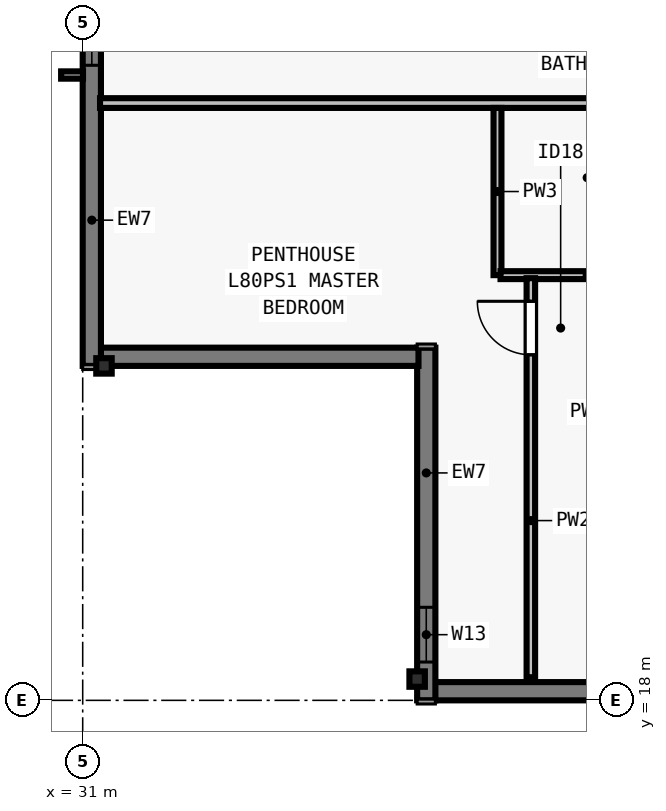
"""IFC4 building model, lengths in metres.
Left out: names, types, materials, properties, quantities, classifications, styles, units other than length and angle.
Written with IfcOpenShell. Run it as: python <this file> out.ifc"""

import sys

from ifc_helpers import new_model, si_unit, direction, frame, frame_2d, origin, origin_2d, place, context, subcontext, project, spatial, rectangle, i_section, extrude, element, fill, save


model = new_model("IFC4")
c1 = context("Model", 3, precision=1e-05, world=origin(), true_north=direction((0.0, 1.0)))
c2 = subcontext(c1, "Body", "Model", "MODEL_VIEW")
j1 = project(units=[si_unit("LENGTHUNIT", "METRE"), si_unit("PLANEANGLEUNIT", "RADIAN")], contexts=[c1])
p1 = place(None, origin())
s1 = spatial("IfcSite", under=j1, at=p1, CompositionType="ELEMENT")
p2 = place(p1, origin())
s2 = spatial("IfcBuilding", under=s1, at=p2, CompositionType="ELEMENT")
p3 = place(p2, frame((0.0, 0.0, 291.0)))
s3 = spatial("IfcBuildingStorey", under=s2, at=p3, CompositionType="ELEMENT", Elevation=291.0)
for number, where, z_axis, x_axis in (
    (1, (36.5, 18.35, 0.0), (0.0, 0.0, 1.0), (1.0, 0.0, 0.0)),
    (2, (31.35, 23.5, 0.0), (0.0, 0.0, 1.0), (0.0, 1.0, 0.0)),
):
    element("IfcColumn", number, at=place(p3, frame(where, z_axis=z_axis, x_axis=x_axis)), inside=s3, PredefinedType="COLUMN", context=c2, shape_type="SweptSolid", body=[
        extrude(i_section(OverallWidth=0.254, OverallDepth=0.254, WebThickness=0.009, FlangeThickness=0.014, FilletRadius=0.013, at=origin_2d()), origin(), (0.0, 0.0, 1.0), 3.5),
    ])
p4 = place(p3, frame((67.5, 18.15, 0.0), z_axis=(0.0, 0.0, 1.0), x_axis=(-1.0, 0.0, 0.0)))
e3 = element("IfcWall", 3, at=p4, inside=s3, PredefinedType="SOLIDWALL", context=c2, shape_type="SweptSolid", body=[
    extrude(rectangle(XDim=30.722, YDim=0.3, at=frame_2d((15.361, 0.0))), origin(), (0.0, 0.0, 1.0), 3.29),
])
p5 = place(p4, frame((4.944, 0.0, 0.8)))
e4 = element("IfcOpeningElement", 4, at=p5, cuts=e3, PredefinedType="OPENING", context=c2, shape_type="SweptSolid", body=[
    extrude(rectangle(XDim=1.65, YDim=1.758, at=frame_2d((0.825, 0.879))), frame((0.0, 0.16, 0.0), z_axis=(0.0, -1.0, 0.0), x_axis=(1.0, 0.0, 0.0)), (0.0, 0.0, 1.0), 0.32),
])
p6 = place(p4, frame((7.756, 0.0, 0.8)))
e5 = element("IfcOpeningElement", 5, at=p6, cuts=e3, PredefinedType="OPENING", context=c2, shape_type="SweptSolid", body=[
    extrude(rectangle(XDim=2.0, YDim=1.758, at=frame_2d((1.0, 0.879))), frame((0.0, 0.16, 0.0), z_axis=(0.0, -1.0, 0.0), x_axis=(1.0, 0.0, 0.0)), (0.0, 0.0, 1.0), 0.32),
])
p7 = place(p4, frame((12.617, 0.0, 0.8)))
e6 = element("IfcOpeningElement", 6, at=p7, cuts=e3, PredefinedType="OPENING", context=c2, shape_type="SweptSolid", body=[
    extrude(rectangle(XDim=1.65, YDim=1.758, at=frame_2d((0.825, 0.879))), frame((0.0, 0.16, 0.0), z_axis=(0.0, -1.0, 0.0), x_axis=(1.0, 0.0, 0.0)), (0.0, 0.0, 1.0), 0.32),
])
p8 = place(p4, frame((16.28, 0.0, 0.8)))
e7 = element("IfcOpeningElement", 7, at=p8, cuts=e3, PredefinedType="OPENING", context=c2, shape_type="SweptSolid", body=[
    extrude(rectangle(XDim=2.0, YDim=1.758, at=frame_2d((1.0, 0.879))), frame((0.0, 0.16, 0.0), z_axis=(0.0, -1.0, 0.0), x_axis=(1.0, 0.0, 0.0)), (0.0, 0.0, 1.0), 0.32),
])
p9 = place(p4, frame((21.142, 0.0, 0.8)))
e8 = element("IfcOpeningElement", 8, at=p9, cuts=e3, PredefinedType="OPENING", context=c2, shape_type="SweptSolid", body=[
    extrude(rectangle(XDim=1.65, YDim=1.758, at=frame_2d((0.825, 0.879))), frame((0.0, 0.16, 0.0), z_axis=(0.0, -1.0, 0.0), x_axis=(1.0, 0.0, 0.0)), (0.0, 0.0, 1.0), 0.32),
])
p10 = place(p4, frame((23.954, 0.0, 0.8)))
e9 = element("IfcOpeningElement", 9, at=p10, cuts=e3, PredefinedType="OPENING", context=c2, shape_type="SweptSolid", body=[
    extrude(rectangle(XDim=2.0, YDim=1.758, at=frame_2d((1.0, 0.879))), frame((0.0, 0.16, 0.0), z_axis=(0.0, -1.0, 0.0), x_axis=(1.0, 0.0, 0.0)), (0.0, 0.0, 1.0), 0.32),
])
p11 = place(p3, frame((36.65, 18.0, 0.0), z_axis=(0.0, 0.0, 1.0), x_axis=(0.0, 1.0, 0.0)))
e10 = element("IfcWall", 10, at=p11, inside=s3, PredefinedType="SOLIDWALL", context=c2, shape_type="SweptSolid", body=[
    extrude(rectangle(XDim=5.8, YDim=0.3, at=frame_2d((2.9, 0.0))), origin(), (0.0, 0.0, 1.0), 3.29),
])
p12 = place(p11, frame((0.63, 0.0, 0.8)))
e11 = element("IfcOpeningElement", 11, at=p12, cuts=e10, PredefinedType="OPENING", context=c2, shape_type="SweptSolid", body=[
    extrude(rectangle(XDim=0.9, YDim=1.75, at=frame_2d((0.45, 0.875))), frame((0.0, 0.16, 0.0), z_axis=(0.0, -1.0, 0.0), x_axis=(1.0, 0.0, 0.0)), (0.0, 0.0, 1.0), 0.32),
])
p13 = place(p3, frame((36.522, 23.65, 0.0), z_axis=(0.0, 0.0, 1.0), x_axis=(-1.0, 0.0, 0.0)))
e12 = element("IfcWall", 12, at=p13, inside=s3, PredefinedType="SOLIDWALL", context=c2, shape_type="SweptSolid", body=[
    extrude(rectangle(XDim=5.244, YDim=0.3, at=frame_2d((2.622, 0.0))), origin(), (0.0, 0.0, 1.0), 3.29),
])
p14 = place(p3, frame((31.15, 23.5, 0.0), z_axis=(0.0, 0.0, 1.0), x_axis=(0.0, 1.0, 0.0)))
e13 = element("IfcWall", 13, at=p14, inside=s3, PredefinedType="SOLIDWALL", context=c2, shape_type="SweptSolid", body=[
    extrude(rectangle(XDim=30.722, YDim=0.3, at=frame_2d((15.361, 0.0))), origin(), (0.0, 0.0, 1.0), 3.29),
])
p15 = place(p14, frame((4.944, 0.0, 0.8)))
e14 = element("IfcOpeningElement", 14, at=p15, cuts=e13, PredefinedType="OPENING", context=c2, shape_type="SweptSolid", body=[
    extrude(rectangle(XDim=1.65, YDim=1.758, at=frame_2d((0.825, 0.879))), frame((0.0, 0.16, 0.0), z_axis=(0.0, -1.0, 0.0), x_axis=(1.0, 0.0, 0.0)), (0.0, 0.0, 1.0), 0.32),
])
p16 = place(p14, frame((7.355, 0.0, 0.8)))
e15 = element("IfcOpeningElement", 15, at=p16, cuts=e13, PredefinedType="OPENING", context=c2, shape_type="SweptSolid", body=[
    extrude(rectangle(XDim=2.0, YDim=1.758, at=frame_2d((1.0, 0.879))), frame((0.0, 0.16, 0.0), z_axis=(0.0, -1.0, 0.0), x_axis=(1.0, 0.0, 0.0)), (0.0, 0.0, 1.0), 0.32),
])
p17 = place(p14, frame((12.617, 0.0, 0.8)))
e16 = element("IfcOpeningElement", 16, at=p17, cuts=e13, PredefinedType="OPENING", context=c2, shape_type="SweptSolid", body=[
    extrude(rectangle(XDim=1.65, YDim=1.758, at=frame_2d((0.825, 0.879))), frame((0.0, 0.16, 0.0), z_axis=(0.0, -1.0, 0.0), x_axis=(1.0, 0.0, 0.0)), (0.0, 0.0, 1.0), 0.32),
])
p18 = place(p14, frame((16.28, 0.0, 0.8)))
e17 = element("IfcOpeningElement", 17, at=p18, cuts=e13, PredefinedType="OPENING", context=c2, shape_type="SweptSolid", body=[
    extrude(rectangle(XDim=2.0, YDim=1.758, at=frame_2d((1.0, 0.879))), frame((0.0, 0.16, 0.0), z_axis=(0.0, -1.0, 0.0), x_axis=(1.0, 0.0, 0.0)), (0.0, 0.0, 1.0), 0.32),
])
p19 = place(p14, frame((21.142, 0.0, 0.8)))
e18 = element("IfcOpeningElement", 18, at=p19, cuts=e13, PredefinedType="OPENING", context=c2, shape_type="SweptSolid", body=[
    extrude(rectangle(XDim=1.65, YDim=1.758, at=frame_2d((0.825, 0.879))), frame((0.0, 0.16, 0.0), z_axis=(0.0, -1.0, 0.0), x_axis=(1.0, 0.0, 0.0)), (0.0, 0.0, 1.0), 0.32),
])
p20 = place(p14, frame((27.11, 0.0, 0.8)))
e19 = element("IfcOpeningElement", 19, at=p20, cuts=e13, PredefinedType="OPENING", context=c2, shape_type="SweptSolid", body=[
    extrude(rectangle(XDim=0.9, YDim=1.75, at=frame_2d((0.45, 0.875))), frame((0.0, 0.16, 0.0), z_axis=(0.0, -1.0, 0.0), x_axis=(1.0, 0.0, 0.0)), (0.0, 0.0, 1.0), 0.32),
])
p21 = place(p3, frame((31.285, 27.823, 0.0), z_axis=(0.0, 0.0, 1.0), x_axis=(1.0, 0.0, 0.0)))
e20 = element("IfcWall", 20, at=p21, inside=s3, PredefinedType="PARTITIONING", context=c2, shape_type="SweptSolid", body=[
    extrude(rectangle(XDim=41.3, YDim=0.16, at=frame_2d((20.65, 0.0))), origin(), (0.0, 0.0, 1.0), 3.009),
])
p22 = place(p21, frame((10.156, 0.0, 0.0)))
e21 = element("IfcOpeningElement", 21, at=p22, cuts=e20, PredefinedType="OPENING", context=c2, shape_type="SweptSolid", body=[
    extrude(rectangle(XDim=0.96, YDim=2.18, at=frame_2d((0.48, 1.09))), frame((0.0, 0.09, 0.0), z_axis=(0.0, -1.0, 0.0), x_axis=(1.0, 0.0, 0.0)), (0.0, 0.0, 1.0), 0.18),
])
p23 = place(p21, frame((30.736, 0.0, 0.0)))
e22 = element("IfcOpeningElement", 22, at=p23, cuts=e20, PredefinedType="OPENING", context=c2, shape_type="SweptSolid", body=[
    extrude(rectangle(XDim=0.96, YDim=2.18, at=frame_2d((0.48, 1.09))), frame((0.0, 0.09, 0.0), z_axis=(0.0, -1.0, 0.0), x_axis=(1.0, 0.0, 0.0)), (0.0, 0.0, 1.0), 0.18),
])
p24 = place(p3, frame((37.821, 24.992, 0.0), z_axis=(0.0, 0.0, 1.0), x_axis=(0.0, 1.0, 0.0)))
e23 = element("IfcWall", 23, at=p24, inside=s3, PredefinedType="PLUMBINGWALL", context=c2, shape_type="SweptSolid", body=[
    extrude(rectangle(XDim=2.75, YDim=0.13, at=frame_2d((1.375, 0.0))), origin(), (0.0, 0.0, 1.0), 3.29),
])
p25 = place(p3, frame((37.871, 24.992, 0.0), z_axis=(0.0, 0.0, 1.0), x_axis=(1.0, 0.0, 0.0)))
e24 = element("IfcWall", 24, at=p25, inside=s3, PredefinedType="PLUMBINGWALL", context=c2, shape_type="SweptSolid", body=[
    extrude(rectangle(XDim=2.85, YDim=0.13, at=frame_2d((1.425, 0.0))), origin(), (0.0, 0.0, 1.0), 3.29),
])
p26 = place(p3, frame((38.37, 18.38, 0.0), z_axis=(0.0, 0.0, 1.0), x_axis=(0.0, 1.0, 0.0)))
e25 = element("IfcWall", 25, at=p26, inside=s3, PredefinedType="PARTITIONING", context=c2, shape_type="SweptSolid", body=[
    extrude(rectangle(XDim=6.562, YDim=0.14, at=frame_2d((3.281, 0.0))), origin(), (0.0, 0.0, 1.0), 2.653),
])
p27 = place(p26, frame((5.302, 0.0, 0.0)))
e26 = element("IfcOpeningElement", 26, at=p27, cuts=e25, PredefinedType="OPENING", context=c2, shape_type="SweptSolid", body=[
    extrude(rectangle(XDim=0.88, YDim=2.1, at=frame_2d((0.44, 1.05))), frame((0.0, 0.08, 0.0), z_axis=(0.0, -1.0, 0.0), x_axis=(1.0, 0.0, 0.0)), (0.0, 0.0, 1.0), 0.16),
])
p28 = place(p15, origin())
e27 = element("IfcWindow", 27, at=p28, inside=s3, PartitioningType="SINGLE_PANEL", PredefinedType="WINDOW", context=c2, shape_type="SweptSolid", body=[
    extrude(rectangle(XDim=1.65, YDim=1.758, at=frame_2d((0.825, 0.879))), frame((0.0, -0.05, 0.0), z_axis=(0.0, -1.0, 0.0), x_axis=(1.0, 0.0, 0.0)), (0.0, 0.0, 1.0), 0.06),
])
fill(e14, e27)
p29 = place(p12, origin())
e28 = element("IfcWindow", 28, at=p29, inside=s3, PartitioningType="SINGLE_PANEL", PredefinedType="WINDOW", context=c2, shape_type="SweptSolid", body=[
    extrude(rectangle(XDim=0.9, YDim=1.75, at=frame_2d((0.45, 0.875))), frame((0.0, -0.04, 0.0), z_axis=(0.0, -1.0, 0.0), x_axis=(1.0, 0.0, 0.0)), (0.0, 0.0, 1.0), 0.06),
])
fill(e11, e28)
p30 = place(p27, origin())
e29 = element("IfcDoor", 29, at=p30, inside=s3, OperationType="SINGLE_SWING_RIGHT", PredefinedType="DOOR", context=c2, shape_type="SweptSolid", body=[
    extrude(rectangle(XDim=0.88, YDim=2.1, at=frame_2d((0.44, 1.05))), frame((0.0, 0.025, 0.0), z_axis=(0.0, -1.0, 0.0), x_axis=(1.0, 0.0, 0.0)), (0.0, 0.0, 1.0), 0.05),
])
fill(e26, e29)
save(model, sys.argv[1])
